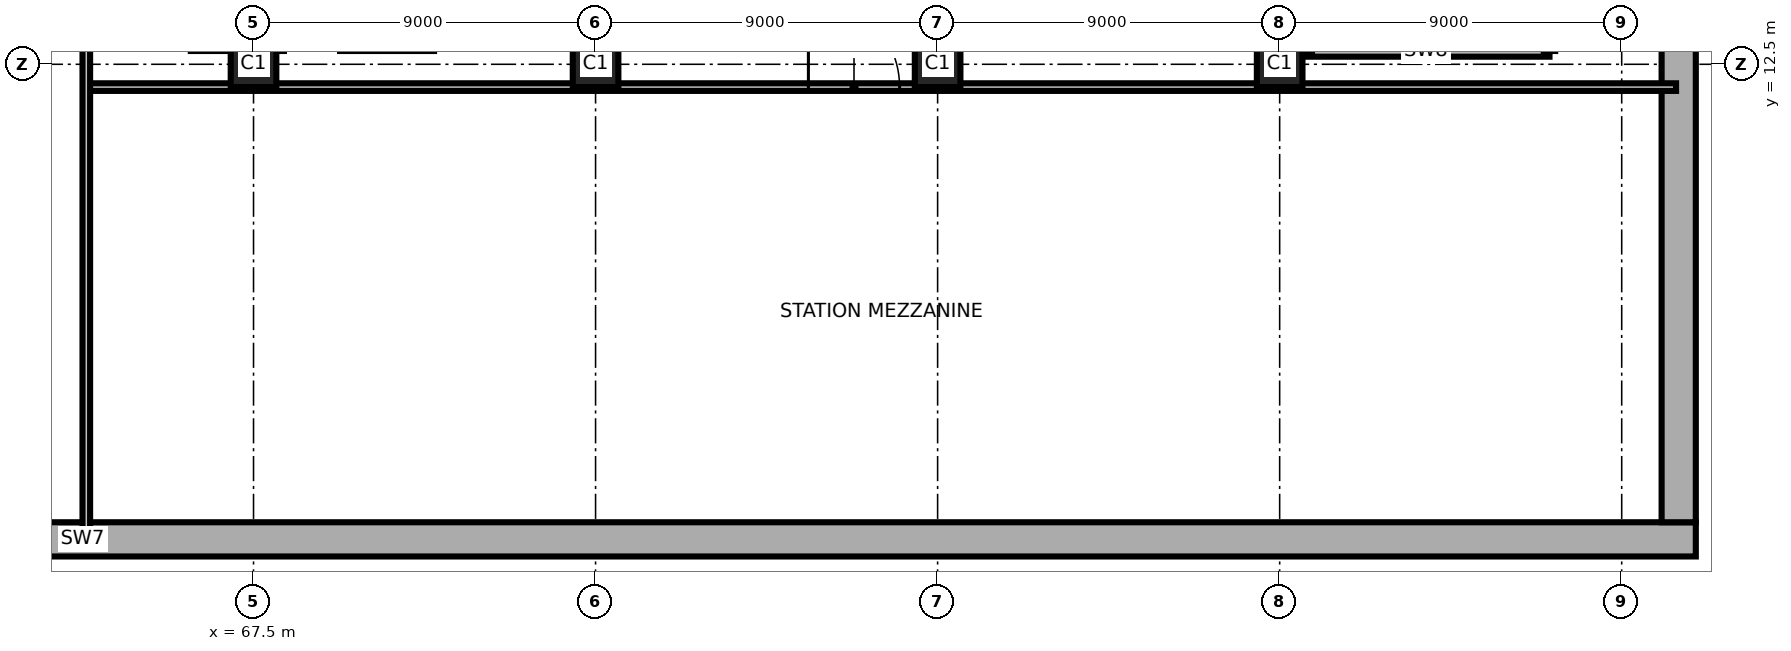
"""IFC4 building model, lengths in metres.
Left out: names, types, materials, properties, quantities, classifications, styles, units other than length and angle.
Written with IfcOpenShell. Run it as: python <this file> out.ifc"""

import sys

from ifc_helpers import new_model, si_unit, direction, frame, frame_2d, origin, origin_2d, place, context, subcontext, project, spatial, rectangle, extrude, element, fill, save


model = new_model("IFC4")
c1 = context("Model", 3, precision=1e-05, world=origin(), true_north=direction((0.0, 1.0)))
c2 = subcontext(c1, "Body", "Model", "MODEL_VIEW")
j1 = project(units=[si_unit("LENGTHUNIT", "METRE"), si_unit("PLANEANGLEUNIT", "RADIAN")], contexts=[c1])
p1 = place(None, origin())
s1 = spatial("IfcSite", under=j1, at=p1, CompositionType="ELEMENT")
p2 = place(p1, origin())
s2 = spatial("IfcBuilding", under=s1, at=p2, CompositionType="ELEMENT")
p3 = place(p2, frame((0.0, 0.0, -4.5)))
s3 = spatial("IfcBuildingStorey", under=s2, at=p3, CompositionType="ELEMENT", Elevation=-4.5)
for number, where, z_axis, x_axis in (
    (1, (67.5, 12.5, 0.0), (0.0, 0.0, 1.0), (1.0, 0.0, 0.0)),
    (2, (76.5, 12.5, 0.0), (0.0, 0.0, 1.0), (1.0, 0.0, 0.0)),
    (3, (85.5, 12.5, 0.0), (0.0, 0.0, 1.0), (1.0, 0.0, 0.0)),
    (4, (94.5, 12.5, 0.0), (0.0, 0.0, 1.0), (1.0, 0.0, 0.0)),
):
    element("IfcColumn", number, at=place(p3, frame(where, z_axis=z_axis, x_axis=x_axis)), inside=s3, PredefinedType="COLUMN", context=c2, shape_type="SweptSolid", body=[
        extrude(rectangle(XDim=1.2, YDim=1.2, at=origin_2d()), origin(), (0.0, 0.0, 1.0), 4.5),
    ])
p4 = place(p3, frame((20.55, 0.0, 0.0), z_axis=(0.0, 0.0, 1.0), x_axis=(1.0, 0.0, 0.0)))
e5 = element("IfcWall", 5, at=p4, inside=s3, PredefinedType="SOLIDWALL", context=c2, shape_type="SweptSolid", body=[
    extrude(rectangle(XDim=84.9, YDim=0.9, at=frame_2d((42.45, 0.0))), origin(), (0.0, 0.0, 1.0), 4.5),
])
p5 = place(p3, frame((105.0, 0.45, 0.0), z_axis=(0.0, 0.0, 1.0), x_axis=(0.0, 1.0, 0.0)))
e6 = element("IfcWall", 6, at=p5, inside=s3, PredefinedType="SOLIDWALL", context=c2, shape_type="SweptSolid", body=[
    extrude(rectangle(XDim=42.0, YDim=0.9, at=frame_2d((21.0, 0.0))), origin(), (0.0, 0.0, 1.0), 4.5),
])
p6 = place(p3, frame((63.1, 11.9, 0.0), z_axis=(0.0, 0.0, 1.0), x_axis=(1.0, 0.0, 0.0)))
e7 = element("IfcWall", 7, at=p6, inside=s3, PredefinedType="PARTITIONING", context=c2, shape_type="SweptSolid", body=[
    extrude(rectangle(XDim=41.83, YDim=0.2, at=frame_2d((20.915, 0.0))), origin(), (0.0, 0.0, 1.0), 4.2),
])
p7 = place(p6, frame((19.0, 0.0, 0.0)))
e8 = element("IfcOpeningElement", 8, at=p7, cuts=e7, PredefinedType="OPENING", context=c2, shape_type="SweptSolid", body=[
    extrude(rectangle(XDim=2.4, YDim=2.1, at=frame_2d((1.2, 1.05))), frame((0.0, 0.11, 0.0), z_axis=(0.0, -1.0, 0.0), x_axis=(1.0, 0.0, 0.0)), (0.0, 0.0, 1.0), 0.22),
])
p8 = place(p3, frame((95.1, 12.85, 0.0), z_axis=(0.0, 0.0, 1.0), x_axis=(1.0, 0.0, 0.0)))
e9 = element("IfcWall", 9, at=p8, inside=s3, PredefinedType="SHEAR", context=c2, shape_type="SweptSolid", body=[
    extrude(rectangle(XDim=6.5, YDim=0.3, at=frame_2d((3.25, 0.0))), origin(), (0.0, 0.0, 1.0), 4.2),
])
p9 = place(p3, frame((63.1, 0.07, 0.0), z_axis=(0.0, 0.0, 1.0), x_axis=(0.0, 1.0, 0.0)))
e10 = element("IfcWall", 10, at=p9, inside=s3, PredefinedType="PARTITIONING", context=c2, shape_type="SweptSolid", body=[
    extrude(rectangle(XDim=30.83, YDim=0.2, at=frame_2d((15.415, 0.0))), origin(), (0.0, 0.0, 1.0), 3.8),
])
p10 = place(p7, origin())
e11 = element("IfcDoor", 11, at=p10, inside=s3, OperationType="SINGLE_SWING_LEFT", PredefinedType="DOOR", context=c2, shape_type="SweptSolid", body=[
    extrude(rectangle(XDim=2.4, YDim=2.1, at=frame_2d((1.2, 1.05))), frame((0.0, 0.025, 0.0), z_axis=(0.0, -1.0, 0.0), x_axis=(1.0, 0.0, 0.0)), (0.0, 0.0, 1.0), 0.05),
])
fill(e8, e11)
save(model, sys.argv[1])
